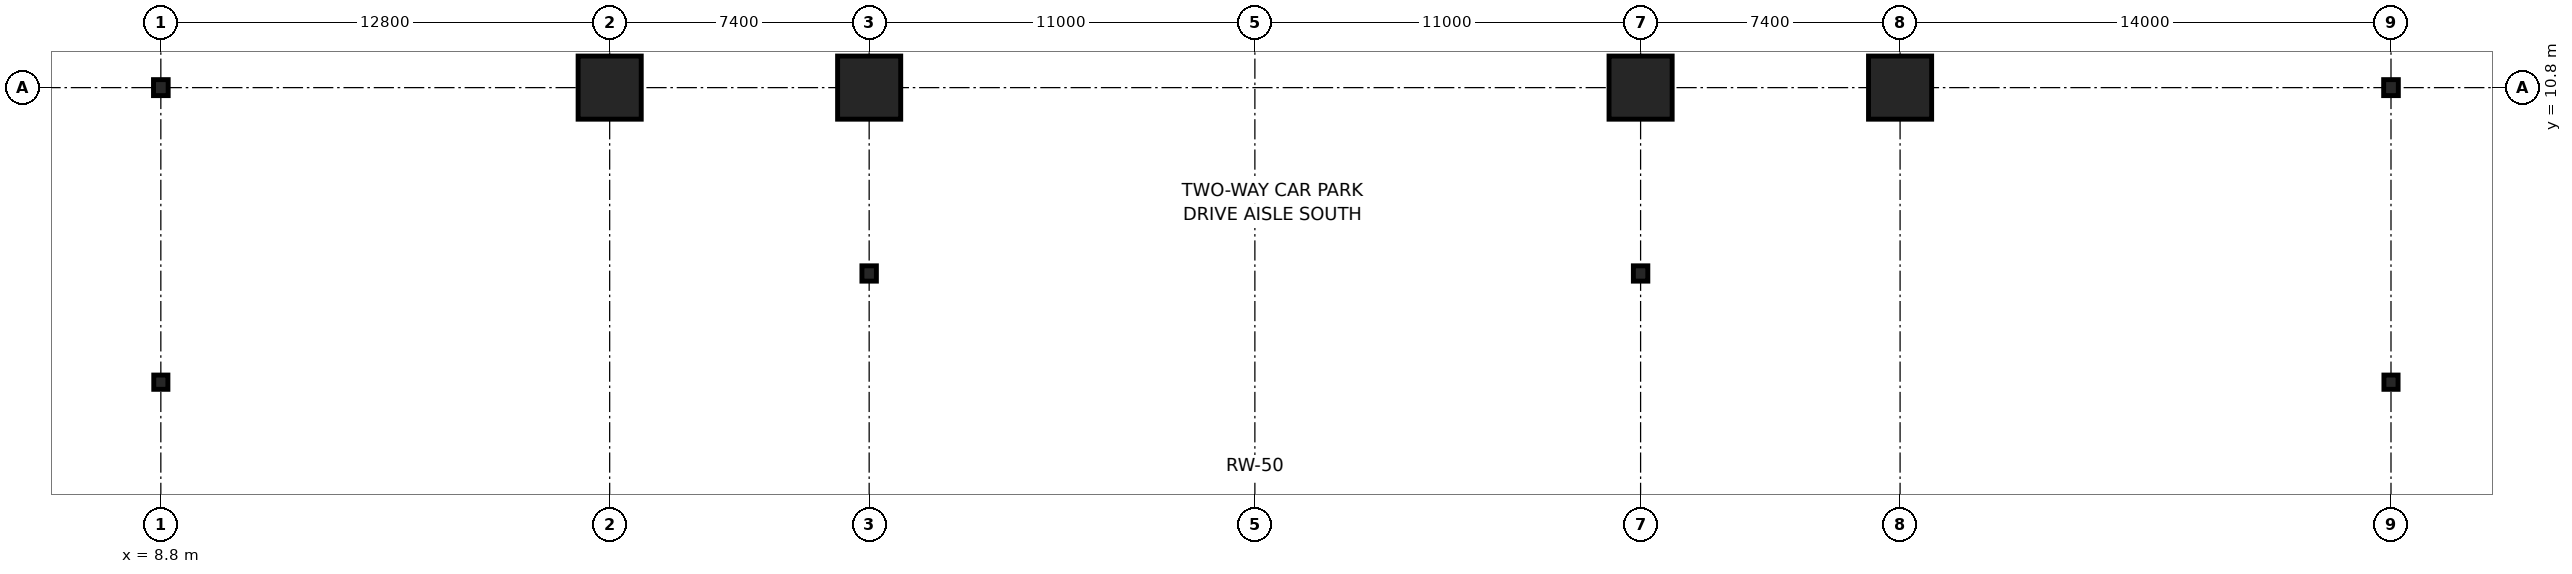
"""IFC4 building model, lengths in metres.
Left out: names, types, materials, properties, quantities, classifications, styles, units other than length and angle.
Written with IfcOpenShell. Run it as: python <this file> out.ifc"""

import sys

from ifc_helpers import new_model, si_unit, direction, frame, origin, origin_2d, place, context, subcontext, project, spatial, rectangle, i_section, extrude, element, save


model = new_model("IFC4")
c1 = context("Model", 3, precision=1e-05, world=origin(), true_north=direction((0.0, 1.0)))
c2 = subcontext(c1, "Body", "Model", "MODEL_VIEW")
j1 = project(units=[si_unit("LENGTHUNIT", "METRE"), si_unit("PLANEANGLEUNIT", "RADIAN")], contexts=[c1])
p1 = place(None, origin())
s1 = spatial("IfcSite", under=j1, at=p1, CompositionType="ELEMENT")
p2 = place(p1, origin())
s2 = spatial("IfcBuilding", under=s1, at=p2, CompositionType="ELEMENT")
p3 = place(p2, frame((0.0, 0.0, -4.5)))
s3 = spatial("IfcBuildingStorey", under=s2, at=p3, CompositionType="ELEMENT", Elevation=-4.5)
for number, where, z_axis, x_axis in (
    (1, (29.0, 10.8, 0.0), (0.0, 0.0, 1.0), (1.0, 0.0, 0.0)),
    (2, (51.0, 10.8, 0.0), (0.0, 0.0, 1.0), (1.0, 0.0, 0.0)),
    (3, (21.6, 10.8, 0.0), (0.0, 0.0, 1.0), (1.0, 0.0, 0.0)),
    (4, (58.4, 10.8, 0.0), (0.0, 0.0, 1.0), (1.0, 0.0, 0.0)),
):
    element("IfcColumn", number, at=place(p3, frame(where, z_axis=z_axis, x_axis=x_axis)), inside=s3, PredefinedType="COLUMN", context=c2, shape_type="SweptSolid", body=[
        extrude(rectangle(XDim=1.8, YDim=1.8, at=origin_2d()), origin(), (0.0, 0.0, 1.0), 4.5),
    ])
for number, where, z_axis, x_axis in (
    (5, (29.0, 5.5, 0.0), (0.0, 0.0, 1.0), (1.0, 0.0, 0.0)),
    (6, (51.0, 5.5, 0.0), (0.0, 0.0, 1.0), (1.0, 0.0, 0.0)),
):
    element("IfcColumn", number, at=place(p3, frame(where, z_axis=z_axis, x_axis=x_axis)), inside=s3, PredefinedType="COLUMN", context=c2, shape_type="SweptSolid", body=[
        extrude(i_section(OverallWidth=0.412, OverallDepth=0.437, WebThickness=0.036, FlangeThickness=0.058, FilletRadius=0.015, at=origin_2d()), origin(), (0.0, 0.0, 1.0), 4.5),
    ])
for number, where, z_axis, x_axis in (
    (7, (8.8, 10.8, 0.0), (0.0, 0.0, 1.0), (1.0, 0.0, 0.0)),
    (8, (72.4, 10.8, 0.0), (0.0, 0.0, 1.0), (1.0, 0.0, 0.0)),
):
    element("IfcColumn", number, at=place(p3, frame(where, z_axis=z_axis, x_axis=x_axis)), inside=s3, PredefinedType="COLUMN", context=c2, shape_type="SweptSolid", body=[
        extrude(i_section(OverallWidth=0.418, OverallDepth=0.456, WebThickness=0.042, FlangeThickness=0.067, FilletRadius=0.015, at=origin_2d()), origin(), (0.0, 0.0, 1.0), 4.5),
    ])
for number, where, z_axis, x_axis in (
    (9, (8.8, 2.4, 0.0), (0.0, 0.0, 1.0), (1.0, 0.0, 0.0)),
    (10, (72.4, 2.4, 0.0), (0.0, 0.0, 1.0), (1.0, 0.0, 0.0)),
):
    element("IfcColumn", number, at=place(p3, frame(where, z_axis=z_axis, x_axis=x_axis)), inside=s3, PredefinedType="COLUMN", context=c2, shape_type="SweptSolid", body=[
        extrude(i_section(OverallWidth=0.403, OverallDepth=0.406, WebThickness=0.027, FlangeThickness=0.043, FilletRadius=0.015, at=origin_2d()), origin(), (0.0, 0.0, 1.0), 4.5),
    ])
save(model, sys.argv[1])
